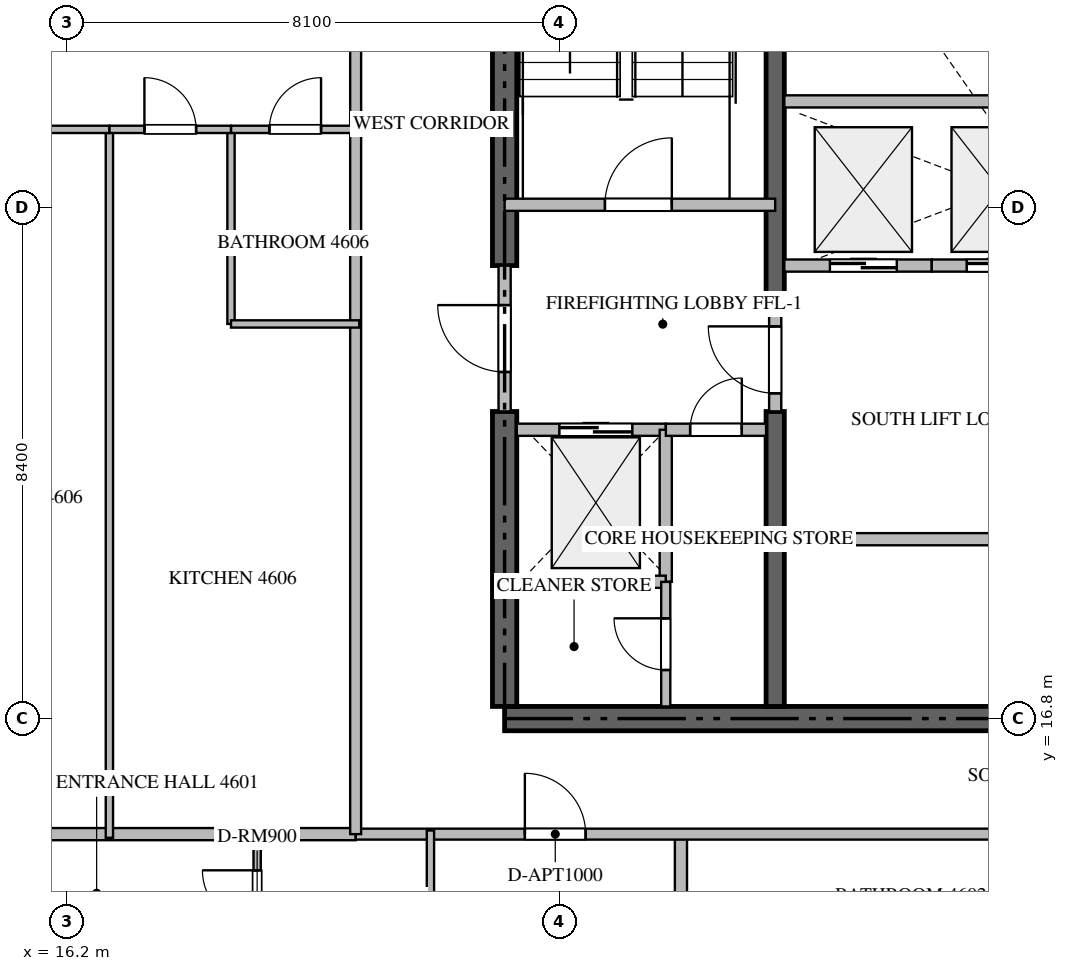
"""IFC4 building model, lengths in metres.
Left out: names, types, materials, properties, quantities, classifications, styles, units other than length and angle.
Written with IfcOpenShell. Run it as: python <this file> out.ifc"""

import sys

from ifc_helpers import new_model, si_unit, direction, frame, frame_2d, origin, place, context, subcontext, project, spatial, rectangle, extrude, source, transform, mapped, element, fill, save


model = new_model("IFC4")
c1 = context("Model", 3, precision=1e-05, world=origin(), true_north=direction((0.0, 1.0)))
c2 = subcontext(c1, "Body", "Model", "MODEL_VIEW")
j1 = project(units=[si_unit("LENGTHUNIT", "METRE"), si_unit("PLANEANGLEUNIT", "RADIAN")], contexts=[c1])
p1 = place(None, origin())
s1 = spatial("IfcSite", under=j1, at=p1, CompositionType="ELEMENT")
p2 = place(p1, origin())
s2 = spatial("IfcBuilding", under=s1, at=p2, CompositionType="ELEMENT")
p3 = place(p2, frame((0.0, 0.0, 183.9)))
s3 = spatial("IfcBuildingStorey", under=s2, at=p3, CompositionType="ELEMENT", Elevation=183.9)
p4 = place(p3, frame((23.4, 16.8, -0.26), z_axis=(0.0, 0.0, 1.0), x_axis=(1.0, 0.0, 0.0)))
e1 = element("IfcWall", 1, at=p4, inside=s3, PredefinedType="SHEAR", context=c2, shape_type="SweptSolid", body=[
    extrude(rectangle(XDim=18.0, YDim=0.4, at=frame_2d((9.0, 0.0))), origin(), (0.0, 0.0, 1.0), 3.748),
])
p5 = place(p3, frame((23.4, 17.0, -0.26), z_axis=(0.0, 0.0, 1.0), x_axis=(0.0, 1.0, 0.0)))
e2 = element("IfcWall", 2, at=p5, inside=s3, PredefinedType="SHEAR", context=c2, shape_type="SweptSolid", body=[
    extrude(rectangle(XDim=4.85, YDim=0.4, at=frame_2d((2.425, 0.0))), origin(), (0.0, 0.0, 1.0), 3.748),
])
p6 = place(p3, frame((23.4, 24.25, -0.26), z_axis=(0.0, 0.0, 1.0), x_axis=(0.0, 1.0, 0.0)))
e3 = element("IfcWall", 3, at=p6, inside=s3, PredefinedType="SHEAR", context=c2, shape_type="SweptSolid", body=[
    extrude(rectangle(XDim=9.15, YDim=0.4, at=frame_2d((4.575, 0.0))), origin(), (0.0, 0.0, 1.0), 3.748),
])
p7 = place(p3, frame((27.85, 17.0, -0.26), z_axis=(0.0, 0.0, 1.0), x_axis=(0.0, 1.0, 0.0)))
e4 = element("IfcWall", 4, at=p7, inside=s3, PredefinedType="SHEAR", context=c2, shape_type="SweptSolid", body=[
    extrude(rectangle(XDim=4.85, YDim=0.3, at=frame_2d((2.425, 0.0))), origin(), (0.0, 0.0, 1.0), 3.748),
])
p8 = place(p3, frame((27.85, 23.55, -0.26), z_axis=(0.0, 0.0, 1.0), x_axis=(0.0, 1.0, 0.0)))
e5 = element("IfcWall", 5, at=p8, inside=s3, PredefinedType="SHEAR", context=c2, shape_type="SweptSolid", body=[
    extrude(rectangle(XDim=9.85, YDim=0.3, at=frame_2d((4.925, 0.0))), origin(), (0.0, 0.0, 1.0), 3.748),
])
p9 = place(p3, frame((23.4, 25.25, 0.0), z_axis=(0.0, 0.0, 1.0), x_axis=(1.0, 0.0, 0.0)))
e6 = element("IfcWall", 6, at=p9, inside=s3, PredefinedType="STANDARD", context=c2, shape_type="SweptSolid", body=[
    extrude(rectangle(XDim=4.45, YDim=0.2, at=frame_2d((2.225, 0.0))), origin(), (0.0, 0.0, 1.0), 3.49),
])
p10 = place(p9, frame((1.65, 0.0, 0.0)))
e7 = element("IfcOpeningElement", 7, at=p10, cuts=e6, PredefinedType="OPENING", context=c2, shape_type="SweptSolid", body=[
    extrude(rectangle(XDim=1.1, YDim=2.15, at=frame_2d((0.55, 1.075))), frame((0.0, 0.11, 0.0), z_axis=(0.0, -1.0, 0.0), x_axis=(1.0, 0.0, 0.0)), (0.0, 0.0, 1.0), 0.22),
])
p11 = place(p3, frame((23.6, 21.55, 0.0), z_axis=(0.0, 0.0, 1.0), x_axis=(1.0, 0.0, 0.0)))
e8 = element("IfcWall", 8, at=p11, inside=s3, PredefinedType="STANDARD", context=c2, shape_type="SweptSolid", body=[
    extrude(rectangle(XDim=2.45, YDim=0.2, at=frame_2d((1.225, 0.0))), origin(), (0.0, 0.0, 1.0), 3.49),
])
p12 = place(p11, frame((0.7, 0.0, 0.0)))
e9 = element("IfcOpeningElement", 9, at=p12, cuts=e8, PredefinedType="OPENING", context=c2, shape_type="SweptSolid", body=[
    extrude(rectangle(XDim=1.2, YDim=2.2, at=frame_2d((0.6, 1.1))), frame((0.0, 0.11, 0.0), z_axis=(0.0, -1.0, 0.0), x_axis=(1.0, 0.0, 0.0)), (0.0, 0.0, 1.0), 0.22),
])
p13 = place(p3, frame((28.0, 24.25, 0.0), z_axis=(0.0, 0.0, 1.0), x_axis=(1.0, 0.0, 0.0)))
e10 = element("IfcWall", 10, at=p13, inside=s3, PredefinedType="STANDARD", context=c2, shape_type="SweptSolid", body=[
    extrude(rectangle(XDim=2.425, YDim=0.2, at=frame_2d((1.212, 0.0))), origin(), (0.0, 0.0, 1.0), 3.49),
])
p14 = place(p13, frame((0.75, 0.0, 0.0)))
e11 = element("IfcOpeningElement", 11, at=p14, cuts=e10, PredefinedType="OPENING", context=c2, shape_type="SweptSolid", body=[
    extrude(rectangle(XDim=1.1, YDim=2.2, at=frame_2d((0.55, 1.1))), frame((0.0, 0.11, 0.0), z_axis=(0.0, -1.0, 0.0), x_axis=(1.0, 0.0, 0.0)), (0.0, 0.0, 1.0), 0.22),
])
p15 = place(p3, frame((30.425, 24.25, 0.0), z_axis=(0.0, 0.0, 1.0), x_axis=(1.0, 0.0, 0.0)))
e12 = element("IfcWall", 12, at=p15, inside=s3, PredefinedType="STANDARD", context=c2, shape_type="SweptSolid", body=[
    extrude(rectangle(XDim=2.25, YDim=0.2, at=frame_2d((1.125, 0.0))), origin(), (0.0, 0.0, 1.0), 3.49),
])
p16 = place(p15, frame((0.575, 0.0, 0.0)))
e13 = element("IfcOpeningElement", 13, at=p16, cuts=e12, PredefinedType="OPENING", context=c2, shape_type="SweptSolid", body=[
    extrude(rectangle(XDim=1.1, YDim=2.2, at=frame_2d((0.55, 1.1))), frame((0.0, 0.11, 0.0), z_axis=(0.0, -1.0, 0.0), x_axis=(1.0, 0.0, 0.0)), (0.0, 0.0, 1.0), 0.22),
])
p17 = place(p3, frame((26.05, 19.05, 0.0), z_axis=(0.0, 0.0, 1.0), x_axis=(0.0, 1.0, 0.0)))
e14 = element("IfcWall", 14, at=p17, inside=s3, PredefinedType="STANDARD", context=c2, shape_type="SweptSolid", body=[
    extrude(rectangle(XDim=2.5, YDim=0.2, at=frame_2d((1.25, 0.0))), origin(), (0.0, 0.0, 1.0), 3.49),
])
p18 = place(p3, frame((23.6, 19.05, 0.0), z_axis=(0.0, 0.0, 1.0), x_axis=(1.0, 0.0, 0.0)))
e15 = element("IfcWall", 15, at=p18, inside=s3, PredefinedType="STANDARD", context=c2, shape_type="SweptSolid", body=[
    extrude(rectangle(XDim=2.45, YDim=0.2, at=frame_2d((1.225, 0.0))), origin(), (0.0, 0.0, 1.0), 3.49),
])
p19 = place(p3, frame((26.052, 21.55, 0.0), z_axis=(0.0, 0.0, 1.0), x_axis=(1.0, 0.0, 0.0)))
e16 = element("IfcWall", 16, at=p19, inside=s3, PredefinedType="STANDARD", context=c2, shape_type="SweptSolid", body=[
    extrude(rectangle(XDim=1.648, YDim=0.2, at=frame_2d((0.824, 0.0))), origin(), (0.0, 0.0, 1.0), 3.49),
])
p20 = place(p19, frame((0.399, 0.0, 0.0)))
e17 = element("IfcOpeningElement", 17, at=p20, cuts=e16, PredefinedType="OPENING", context=c2, shape_type="SweptSolid", body=[
    extrude(rectangle(XDim=0.85, YDim=2.1, at=frame_2d((0.425, 1.05))), frame((0.0, 0.11, 0.0), z_axis=(0.0, -1.0, 0.0), x_axis=(1.0, 0.0, 0.0)), (0.0, 0.0, 1.0), 0.22),
])
p21 = place(p3, frame((23.4, 21.852, 0.0), z_axis=(0.0, 0.0, 1.0), x_axis=(0.0, 1.0, 0.0)))
e18 = element("IfcWall", 18, at=p21, inside=s3, PredefinedType="STANDARD", context=c2, shape_type="SweptSolid", body=[
    extrude(rectangle(XDim=2.396, YDim=0.2, at=frame_2d((1.198, 0.0))), origin(), (0.0, 0.0, 1.0), 3.49),
])
p22 = place(p21, frame((0.648, 0.0, 0.0)))
e19 = element("IfcOpeningElement", 19, at=p22, cuts=e18, PredefinedType="OPENING", context=c2, shape_type="SweptSolid", body=[
    extrude(rectangle(XDim=1.1, YDim=2.15, at=frame_2d((0.55, 1.075))), frame((0.0, 0.11, 0.0), z_axis=(0.0, -1.0, 0.0), x_axis=(1.0, 0.0, 0.0)), (0.0, 0.0, 1.0), 0.22),
])
p23 = place(p3, frame((27.85, 21.852, 0.0), z_axis=(0.0, 0.0, 1.0), x_axis=(0.0, 1.0, 0.0)))
e20 = element("IfcWall", 20, at=p23, inside=s3, PredefinedType="STANDARD", context=c2, shape_type="SweptSolid", body=[
    extrude(rectangle(XDim=1.696, YDim=0.2, at=frame_2d((0.848, 0.0))), origin(), (0.0, 0.0, 1.0), 3.49),
])
p24 = place(p23, frame((0.298, 0.0, 0.0)))
e21 = element("IfcOpeningElement", 21, at=p24, cuts=e20, PredefinedType="OPENING", context=c2, shape_type="SweptSolid", body=[
    extrude(rectangle(XDim=1.1, YDim=2.15, at=frame_2d((0.55, 1.075))), frame((0.0, 0.11, 0.0), z_axis=(0.0, -1.0, 0.0), x_axis=(1.0, 0.0, 0.0)), (0.0, 0.0, 1.0), 0.22),
])
p25 = place(p3, frame((28.0, 26.95, 0.0), z_axis=(0.0, 0.0, 1.0), x_axis=(1.0, 0.0, 0.0)))
e22 = element("IfcWall", 22, at=p25, inside=s3, PredefinedType="STANDARD", context=c2, shape_type="SweptSolid", body=[
    extrude(rectangle(XDim=6.95, YDim=0.2, at=frame_2d((3.475, 0.0))), origin(), (0.0, 0.0, 1.0), 3.49),
])
p26 = place(p3, frame((26.05, 17.0, 0.0), z_axis=(0.0, 0.0, 1.0), x_axis=(0.0, 1.0, 0.0)))
e23 = element("IfcWall", 23, at=p26, inside=s3, PredefinedType="PARTITIONING", context=c2, shape_type="SweptSolid", body=[
    extrude(rectangle(XDim=2.048, YDim=0.15, at=frame_2d((1.024, 0.0))), origin(), (0.0, 0.0, 1.0), 3.49),
])
p27 = place(p26, frame((0.599, 0.0, 0.0)))
e24 = element("IfcOpeningElement", 24, at=p27, cuts=e23, PredefinedType="OPENING", context=c2, shape_type="SweptSolid", body=[
    extrude(rectangle(XDim=0.85, YDim=2.1, at=frame_2d((0.425, 1.05))), frame((0.0, 0.085, 0.0), z_axis=(0.0, -1.0, 0.0), x_axis=(1.0, 0.0, 0.0)), (0.0, 0.0, 1.0), 0.17),
])
p28 = place(p3, frame((28.0, 19.75, 0.0), z_axis=(0.0, 0.0, 1.0), x_axis=(1.0, 0.0, 0.0)))
e25 = element("IfcWall", 25, at=p28, inside=s3, PredefinedType="STANDARD", context=c2, shape_type="SweptSolid", body=[
    extrude(rectangle(XDim=8.8, YDim=0.2, at=frame_2d((4.4, 0.0))), origin(), (0.0, 0.0, 1.0), 3.49),
])
p29 = place(p28, frame((3.95, 0.0, 0.0)))
e26 = element("IfcOpeningElement", 26, at=p29, cuts=e25, PredefinedType="OPENING", context=c2, shape_type="SweptSolid", body=[
    extrude(rectangle(XDim=0.9, YDim=2.1, at=frame_2d((0.45, 1.05))), frame((0.0, 0.11, 0.0), z_axis=(0.0, -1.0, 0.0), x_axis=(1.0, 0.0, 0.0)), (0.0, 0.0, 1.0), 0.22),
])
p30 = place(p3, frame((26.3, 1.482, 0.0), z_axis=(0.0, 0.0, 1.0), x_axis=(0.0, 1.0, 0.0)))
e27 = element("IfcWall", 27, at=p30, inside=s3, PredefinedType="PARTITIONING", context=c2, shape_type="SweptSolid", body=[
    extrude(rectangle(XDim=13.418, YDim=0.2, at=frame_2d((6.709, 0.0))), origin(), (0.0, 0.0, 1.0), 3.49),
])
p31 = place(p3, frame((7.882, 14.9, 0.0), z_axis=(0.0, 0.0, 1.0), x_axis=(1.0, 0.0, 0.0)))
e28 = element("IfcWall", 28, at=p31, inside=s3, PredefinedType="PARTITIONING", context=c2, shape_type="SweptSolid", body=[
    extrude(rectangle(XDim=13.068, YDim=0.2, at=frame_2d((6.534, 0.0))), origin(), (0.0, 0.0, 1.0), 3.49),
])
p32 = place(p3, frame((20.952, 14.9, 0.0), z_axis=(0.0, 0.0, 1.0), x_axis=(1.0, 0.0, 0.0)))
e29 = element("IfcWall", 29, at=p32, inside=s3, PredefinedType="PARTITIONING", context=c2, shape_type="SweptSolid", body=[
    extrude(rectangle(XDim=22.896, YDim=0.18, at=frame_2d((11.448, 0.0))), origin(), (0.0, 0.0, 1.0), 3.49),
])
p33 = place(p32, frame((2.781, 0.0, 0.0)))
e30 = element("IfcOpeningElement", 30, at=p33, cuts=e29, PredefinedType="OPENING", context=c2, shape_type="SweptSolid", body=[
    extrude(rectangle(XDim=1.0, YDim=2.15, at=frame_2d((0.5, 1.075))), frame((0.0, 0.1, 0.0), z_axis=(0.0, -1.0, 0.0), x_axis=(1.0, 0.0, 0.0)), (0.0, 0.0, 1.0), 0.2),
])
p34 = place(p32, frame((14.736, 0.0, 0.0)))
e31 = element("IfcOpeningElement", 31, at=p34, cuts=e29, PredefinedType="OPENING", context=c2, shape_type="SweptSolid", body=[
    extrude(rectangle(XDim=1.0, YDim=2.15, at=frame_2d((0.5, 1.075))), frame((0.0, 0.1, 0.0), z_axis=(0.0, -1.0, 0.0), x_axis=(1.0, 0.0, 0.0)), (0.0, 0.0, 1.0), 0.2),
])
p35 = place(p32, frame((19.115, 0.0, 0.0)))
e32 = element("IfcOpeningElement", 32, at=p35, cuts=e29, PredefinedType="OPENING", context=c2, shape_type="SweptSolid", body=[
    extrude(rectangle(XDim=1.0, YDim=2.15, at=frame_2d((0.5, 1.075))), frame((0.0, 0.1, 0.0), z_axis=(0.0, -1.0, 0.0), x_axis=(1.0, 0.0, 0.0)), (0.0, 0.0, 1.0), 0.2),
])
p36 = place(p3, frame((20.95, 14.9, 0.0), z_axis=(0.0, 0.0, 1.0), x_axis=(0.0, 1.0, 0.0)))
e33 = element("IfcWall", 33, at=p36, inside=s3, PredefinedType="PARTITIONING", context=c2, shape_type="SweptSolid", body=[
    extrude(rectangle(XDim=18.7, YDim=0.18, at=frame_2d((9.35, 0.0))), origin(), (0.0, 0.0, 1.0), 3.49),
])
p37 = place(p36, frame((14.603, 0.0, 0.0)))
e34 = element("IfcOpeningElement", 34, at=p37, cuts=e33, PredefinedType="OPENING", context=c2, shape_type="SweptSolid", body=[
    extrude(rectangle(XDim=1.0, YDim=2.15, at=frame_2d((0.5, 1.075))), frame((0.0, 0.1, 0.0), z_axis=(0.0, -1.0, 0.0), x_axis=(1.0, 0.0, 0.0)), (0.0, 0.0, 1.0), 0.2),
])
p38 = place(p3, frame((22.18, 12.15, 0.0), z_axis=(0.0, 0.0, 1.0), x_axis=(0.0, 1.0, 0.0)))
e35 = element("IfcWall", 35, at=p38, inside=s3, PredefinedType="PARTITIONING", context=c2, shape_type="SweptSolid", body=[
    extrude(rectangle(XDim=2.81, YDim=0.12, at=frame_2d((1.405, 0.0))), origin(), (0.0, 0.0, 1.0), 3.49),
])
p39 = place(p3, frame((19.33, 12.75, 0.0), z_axis=(0.0, 0.0, 1.0), x_axis=(0.0, 1.0, 0.0)))
e36 = element("IfcWall", 36, at=p39, inside=s3, PredefinedType="PARTITIONING", context=c2, shape_type="SweptSolid", body=[
    extrude(rectangle(XDim=2.21, YDim=0.12, at=frame_2d((1.105, 0.0))), origin(), (0.0, 0.0, 1.0), 3.49),
])
p40 = place(p39, frame((0.655, 0.0, 0.0)))
e37 = element("IfcOpeningElement", 37, at=p40, cuts=e36, PredefinedType="OPENING", context=c2, shape_type="SweptSolid", body=[
    extrude(rectangle(XDim=0.9, YDim=2.1, at=frame_2d((0.45, 1.05))), frame((0.0, 0.07, 0.0), z_axis=(0.0, -1.0, 0.0), x_axis=(1.0, 0.0, 0.0)), (0.0, 0.0, 1.0), 0.14),
])
p41 = place(p3, frame((16.9, 14.84, 0.0), z_axis=(0.0, 0.0, 1.0), x_axis=(0.0, 1.0, 0.0)))
e38 = element("IfcWall", 38, at=p41, inside=s3, PredefinedType="PARTITIONING", context=c2, shape_type="SweptSolid", body=[
    extrude(rectangle(XDim=11.65, YDim=0.12, at=frame_2d((5.825, 0.0))), origin(), (0.0, 0.0, 1.0), 2.972),
])
p42 = place(p3, frame((18.9, 23.29, 0.0), z_axis=(0.0, 0.0, 1.0), x_axis=(0.0, 1.0, 0.0)))
e39 = element("IfcWall", 39, at=p42, inside=s3, PredefinedType="PARTITIONING", context=c2, shape_type="SweptSolid", body=[
    extrude(rectangle(XDim=3.2, YDim=0.12, at=frame_2d((1.6, 0.0))), origin(), (0.0, 0.0, 1.0), 3.49),
])
p43 = place(p3, frame((18.9, 23.29, 0.0), z_axis=(0.0, 0.0, 1.0), x_axis=(1.0, 0.0, 0.0)))
e40 = element("IfcWall", 40, at=p43, inside=s3, PredefinedType="PARTITIONING", context=c2, shape_type="SweptSolid", body=[
    extrude(rectangle(XDim=2.11, YDim=0.12, at=frame_2d((1.055, 0.0))), origin(), (0.0, 0.0, 1.0), 3.49),
])
p44 = place(p3, frame((11.761, 26.49, 0.0), z_axis=(0.0, 0.0, 1.0), x_axis=(1.0, 0.0, 0.0)))
e41 = element("IfcWall", 41, at=p44, inside=s3, PredefinedType="PARTITIONING", context=c2, shape_type="SweptSolid", body=[
    extrude(rectangle(XDim=5.139, YDim=0.12, at=frame_2d((2.569, 0.0))), origin(), (0.0, 0.0, 1.0), 3.49),
])
p45 = place(p44, frame((2.144, 0.0, 0.0)))
e42 = element("IfcOpeningElement", 42, at=p45, cuts=e41, PredefinedType="OPENING", context=c2, shape_type="SweptSolid", body=[
    extrude(rectangle(XDim=0.85, YDim=2.1, at=frame_2d((0.425, 1.05))), frame((0.0, 0.07, 0.0), z_axis=(0.0, -1.0, 0.0), x_axis=(1.0, 0.0, 0.0)), (0.0, 0.0, 1.0), 0.14),
])
p46 = place(p3, frame((16.902, 26.49, 0.0), z_axis=(0.0, 0.0, 1.0), x_axis=(1.0, 0.0, 0.0)))
e43 = element("IfcWall", 43, at=p46, inside=s3, PredefinedType="PARTITIONING", context=c2, shape_type="SweptSolid", body=[
    extrude(rectangle(XDim=1.998, YDim=0.12, at=frame_2d((0.999, 0.0))), origin(), (0.0, 0.0, 1.0), 3.49),
])
p47 = place(p46, frame((0.574, 0.0, 0.0)))
e44 = element("IfcOpeningElement", 44, at=p47, cuts=e43, PredefinedType="OPENING", context=c2, shape_type="SweptSolid", body=[
    extrude(rectangle(XDim=0.85, YDim=2.1, at=frame_2d((0.425, 1.05))), frame((0.0, 0.07, 0.0), z_axis=(0.0, -1.0, 0.0), x_axis=(1.0, 0.0, 0.0)), (0.0, 0.0, 1.0), 0.14),
])
p48 = place(p3, frame((18.902, 26.49, 0.0), z_axis=(0.0, 0.0, 1.0), x_axis=(1.0, 0.0, 0.0)))
e45 = element("IfcWall", 45, at=p48, inside=s3, PredefinedType="PARTITIONING", context=c2, shape_type="SweptSolid", body=[
    extrude(rectangle(XDim=2.108, YDim=0.12, at=frame_2d((1.054, 0.0))), origin(), (0.0, 0.0, 1.0), 3.49),
])
p49 = place(p48, frame((0.629, 0.0, 0.0)))
e46 = element("IfcOpeningElement", 46, at=p49, cuts=e45, PredefinedType="OPENING", context=c2, shape_type="SweptSolid", body=[
    extrude(rectangle(XDim=0.85, YDim=2.1, at=frame_2d((0.425, 1.05))), frame((0.0, 0.07, 0.0), z_axis=(0.0, -1.0, 0.0), x_axis=(1.0, 0.0, 0.0)), (0.0, 0.0, 1.0), 0.14),
])
m1 = source(origin(), c2, "Body", "SweptSolid", [
    extrude(rectangle(XDim=1.1, YDim=2.15, at=frame_2d((0.55, 1.075))), frame((0.0, 0.025, 0.0), z_axis=(0.0, -1.0, 0.0), x_axis=(1.0, 0.0, 0.0)), (0.0, 0.0, 1.0), 0.05),
])
p50 = place(p10, origin())
e47 = element("IfcDoor", 47, at=p50, inside=s3, OperationType="SINGLE_SWING_RIGHT", PredefinedType="DOOR", context=c2, shape_type="MappedRepresentation", body=[
    mapped(m1, transform((0.0, 0.0, 0.0), scale=1.0)),
])
fill(e7, e47)
m2 = source(origin(), c2, "Body", "SweptSolid", [
    extrude(rectangle(XDim=1.2, YDim=2.2, at=frame_2d((0.6, 1.1))), frame((0.0, 0.025, 0.0), z_axis=(0.0, -1.0, 0.0), x_axis=(1.0, 0.0, 0.0)), (0.0, 0.0, 1.0), 0.05),
])
p51 = place(p12, origin())
e48 = element("IfcDoor", 48, at=p51, inside=s3, OperationType="DOUBLE_DOOR_SLIDING", PredefinedType="DOOR", context=c2, shape_type="MappedRepresentation", body=[
    mapped(m2, transform((0.0, 0.0, 0.0), scale=1.0)),
])
fill(e9, e48)
m3 = source(origin(), c2, "Body", "SweptSolid", [
    extrude(rectangle(XDim=1.1, YDim=2.2, at=frame_2d((0.55, 1.1))), frame((0.0, 0.025, 0.0), z_axis=(0.0, -1.0, 0.0), x_axis=(1.0, 0.0, 0.0)), (0.0, 0.0, 1.0), 0.05),
])
p52 = place(p14, origin())
e49 = element("IfcDoor", 49, at=p52, inside=s3, OperationType="DOUBLE_DOOR_SLIDING", PredefinedType="DOOR", context=c2, shape_type="MappedRepresentation", body=[
    mapped(m3, transform((0.0, 0.0, 0.0), scale=1.0)),
])
fill(e11, e49)
p53 = place(p16, origin())
e50 = element("IfcDoor", 50, at=p53, inside=s3, OperationType="DOUBLE_DOOR_SLIDING", PredefinedType="DOOR", context=c2, shape_type="MappedRepresentation", body=[
    mapped(m3, transform((0.0, 0.0, 0.0), scale=1.0)),
])
fill(e13, e50)
m4 = source(origin(), c2, "Body", "SweptSolid", [
    extrude(rectangle(XDim=0.85, YDim=2.1, at=frame_2d((0.425, 1.05))), frame((0.0, 0.025, 0.0), z_axis=(0.0, -1.0, 0.0), x_axis=(1.0, 0.0, 0.0)), (0.0, 0.0, 1.0), 0.05),
])
p54 = place(p20, origin())
e51 = element("IfcDoor", 51, at=p54, inside=s3, OperationType="SINGLE_SWING_RIGHT", PredefinedType="DOOR", context=c2, shape_type="MappedRepresentation", body=[
    mapped(m4, transform((0.0, 0.0, 0.0), scale=1.0)),
])
fill(e17, e51)
p55 = place(p22, origin())
e52 = element("IfcDoor", 52, at=p55, inside=s3, OperationType="SINGLE_SWING_RIGHT", PredefinedType="DOOR", context=c2, shape_type="MappedRepresentation", body=[
    mapped(m1, transform((0.0, 0.0, 0.0), scale=1.0)),
])
fill(e19, e52)
p56 = place(p24, origin())
e53 = element("IfcDoor", 53, at=p56, inside=s3, OperationType="SINGLE_SWING_RIGHT", PredefinedType="DOOR", context=c2, shape_type="MappedRepresentation", body=[
    mapped(m1, transform((0.0, 0.0, 0.0), scale=1.0)),
])
fill(e21, e53)
p57 = place(p27, origin())
e54 = element("IfcDoor", 54, at=p57, inside=s3, OperationType="SINGLE_SWING_RIGHT", PredefinedType="DOOR", context=c2, shape_type="MappedRepresentation", body=[
    mapped(m4, transform((0.0, 0.0, 0.0), scale=1.0)),
])
fill(e24, e54)
m5 = source(origin(), c2, "Body", "SweptSolid", [
    extrude(rectangle(XDim=1.0, YDim=2.15, at=frame_2d((0.5, 1.075))), frame((0.0, 0.025, 0.0), z_axis=(0.0, -1.0, 0.0), x_axis=(1.0, 0.0, 0.0)), (0.0, 0.0, 1.0), 0.05),
])
p58 = place(p33, origin())
e55 = element("IfcDoor", 55, at=p58, inside=s3, OperationType="SINGLE_SWING_LEFT", PredefinedType="DOOR", context=c2, shape_type="MappedRepresentation", body=[
    mapped(m5, transform((0.0, 0.0, 0.0), scale=1.0)),
])
fill(e30, e55)
m6 = source(origin(), c2, "Body", "SweptSolid", [
    extrude(rectangle(XDim=0.9, YDim=2.1, at=frame_2d((0.45, 1.05))), frame((0.0, 0.025, 0.0), z_axis=(0.0, -1.0, 0.0), x_axis=(1.0, 0.0, 0.0)), (0.0, 0.0, 1.0), 0.05),
])
p59 = place(p40, origin())
e56 = element("IfcDoor", 56, at=p59, inside=s3, OperationType="SINGLE_SWING_RIGHT", PredefinedType="DOOR", context=c2, shape_type="MappedRepresentation", body=[
    mapped(m6, transform((0.0, 0.0, 0.0), scale=1.0)),
])
fill(e37, e56)
p60 = place(p47, origin())
e57 = element("IfcDoor", 57, at=p60, inside=s3, OperationType="SINGLE_SWING_LEFT", PredefinedType="DOOR", context=c2, shape_type="MappedRepresentation", body=[
    mapped(m4, transform((0.0, 0.0, 0.0), scale=1.0)),
])
fill(e44, e57)
p61 = place(p49, origin())
e58 = element("IfcDoor", 58, at=p61, inside=s3, OperationType="SINGLE_SWING_RIGHT", PredefinedType="DOOR", context=c2, shape_type="MappedRepresentation", body=[
    mapped(m4, transform((0.0, 0.0, 0.0), scale=1.0)),
])
fill(e46, e58)
save(model, sys.argv[1])
